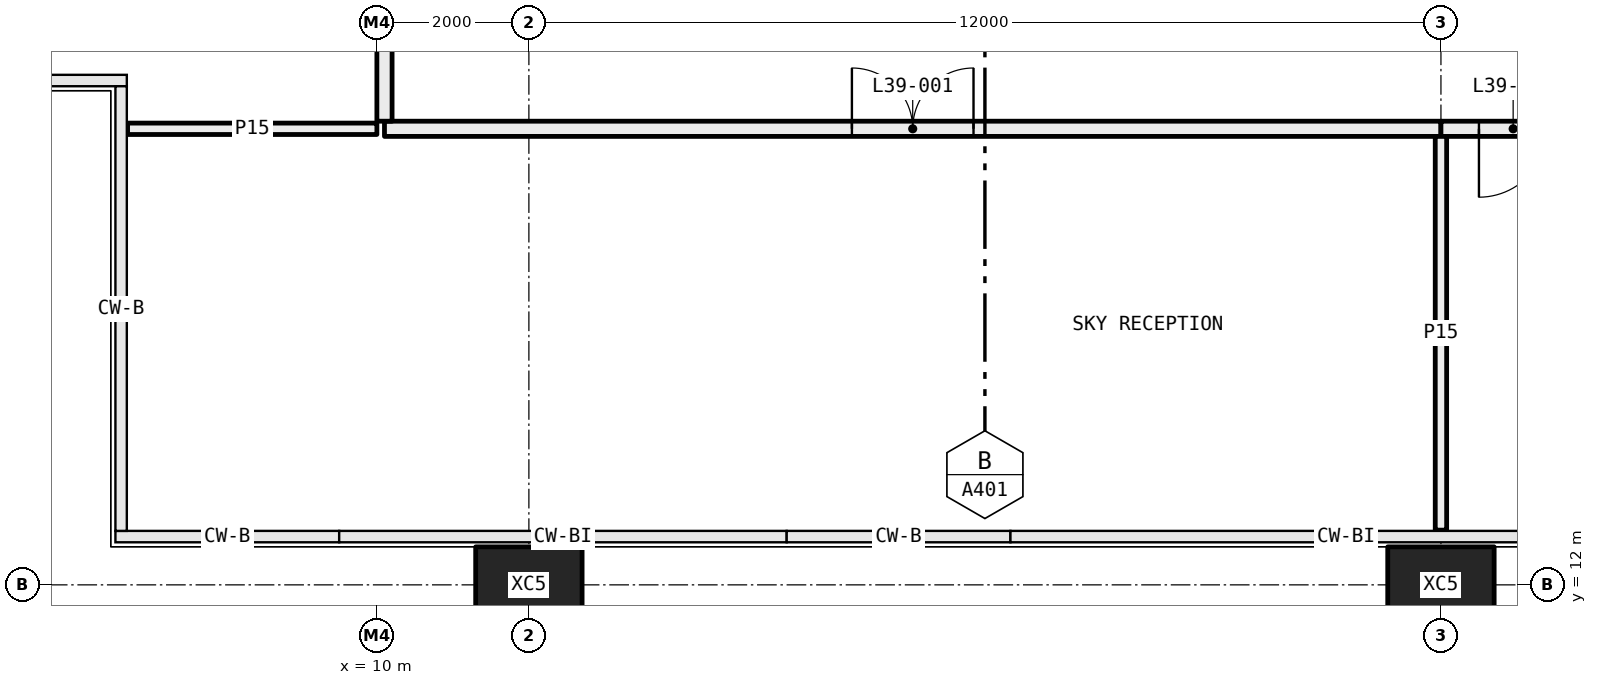
"""IFC4 building model, lengths in metres.
Left out: names, types, materials, properties, quantities, classifications, styles, units other than length and angle.
Written with IfcOpenShell. Run it as: python <this file> out.ifc"""

import sys

from ifc_helpers import new_model, si_unit, direction, frame, frame_2d, origin, origin_2d, place, context, subcontext, project, spatial, rectangle, hollow_rectangle, extrude, element, fill, save


model = new_model("IFC4")
c1 = context("Model", 3, precision=1e-05, world=origin(), true_north=direction((0.0, 1.0)))
c2 = subcontext(c1, "Body", "Model", "MODEL_VIEW")
j1 = project(units=[si_unit("LENGTHUNIT", "METRE"), si_unit("PLANEANGLEUNIT", "RADIAN")], contexts=[c1])
p1 = place(None, origin())
s1 = spatial("IfcSite", under=j1, at=p1, CompositionType="ELEMENT")
p2 = place(p1, origin())
s2 = spatial("IfcBuilding", under=s1, at=p2, CompositionType="ELEMENT")
p3 = place(p2, frame((0.0, 0.0, 148.35)))
s3 = spatial("IfcBuildingStorey", under=s2, at=p3, CompositionType="ELEMENT", Elevation=148.35)
for number, where, z_axis, x_axis in (
    (1, (12.0, 12.0, -0.4), (0.0, 0.0, 1.0), (1.0, 0.0, 0.0)),
    (2, (24.0, 12.0, -0.4), (0.0, 0.0, 1.0), (1.0, 0.0, 0.0)),
):
    element("IfcColumn", number, at=place(p3, frame(where, z_axis=z_axis, x_axis=x_axis)), inside=s3, PredefinedType="COLUMN", context=c2, shape_type="SweptSolid", body=[
        extrude(hollow_rectangle(XDim=1.4, YDim=1.0, WallThickness=0.055, at=origin_2d()), origin(), (0.0, 0.0, 1.0), 5.4),
    ])
p4 = place(p3, frame((10.1, 18.0, 0.0), z_axis=(0.0, 0.0, 1.0), x_axis=(1.0, 0.0, 0.0)))
e3 = element("IfcWall", 3, at=p4, inside=s3, PredefinedType="PARTITIONING", context=c2, shape_type="SweptSolid", body=[
    extrude(rectangle(XDim=13.9, YDim=0.2, at=frame_2d((6.95, 0.0))), origin(), (0.0, 0.0, 1.0), 5.0),
])
p5 = place(p4, frame((6.15, 0.0, 0.0)))
e4 = element("IfcOpeningElement", 4, at=p5, cuts=e3, PredefinedType="OPENING", context=c2, shape_type="SweptSolid", body=[
    extrude(rectangle(XDim=1.6, YDim=2.1, at=frame_2d((0.8, 1.05))), frame((0.0, 0.11, 0.0), z_axis=(0.0, -1.0, 0.0), x_axis=(1.0, 0.0, 0.0)), (0.0, 0.0, 1.0), 0.22),
])
p6 = place(p3, frame((24.0, 18.0, 0.0), z_axis=(0.0, 0.0, 1.0), x_axis=(1.0, 0.0, 0.0)))
e5 = element("IfcWall", 5, at=p6, inside=s3, PredefinedType="PARTITIONING", context=c2, shape_type="SweptSolid", body=[
    extrude(rectangle(XDim=1.9, YDim=0.2, at=frame_2d((0.95, 0.0))), origin(), (0.0, 0.0, 1.0), 5.0),
])
p7 = place(p6, frame((0.5, 0.0, 0.0)))
e6 = element("IfcOpeningElement", 6, at=p7, cuts=e5, PredefinedType="OPENING", context=c2, shape_type="SweptSolid", body=[
    extrude(rectangle(XDim=0.9, YDim=2.1, at=frame_2d((0.45, 1.05))), frame((0.0, 0.11, 0.0), z_axis=(0.0, -1.0, 0.0), x_axis=(1.0, 0.0, 0.0)), (0.0, 0.0, 1.0), 0.22),
])
p8 = place(p3, frame((10.1, 23.9, 0.0), z_axis=(0.0, 0.0, 1.0), x_axis=(0.0, -1.0, 0.0)))
e7 = element("IfcWall", 7, at=p8, inside=s3, PredefinedType="PARTITIONING", context=c2, shape_type="SweptSolid", body=[
    extrude(rectangle(XDim=5.8, YDim=0.2, at=frame_2d((2.9, 0.0))), origin(), (0.0, 0.0, 1.0), 5.0),
])
p9 = place(p3, frame((24.0, 12.72, 0.0), z_axis=(0.0, 0.0, 1.0), x_axis=(0.0, 1.0, 0.0)))
e8 = element("IfcWall", 8, at=p9, inside=s3, PredefinedType="PARTITIONING", context=c2, shape_type="SweptSolid", body=[
    extrude(rectangle(XDim=5.18, YDim=0.15, at=frame_2d((2.59, 0.0))), origin(), (0.0, 0.0, 1.0), 5.0),
])
p10 = place(p3, frame((10.0, 18.0, 0.0), z_axis=(0.0, 0.0, 1.0), x_axis=(-1.0, 0.0, 0.0)))
e9 = element("IfcWall", 9, at=p10, inside=s3, PredefinedType="PARTITIONING", context=c2, shape_type="SweptSolid", body=[
    extrude(rectangle(XDim=3.28, YDim=0.15, at=frame_2d((1.64, 0.0))), origin(), (0.0, 0.0, 1.0), 5.0),
])
p11 = place(p5, origin())
e10 = element("IfcDoor", 10, at=p11, inside=s3, OperationType="DOUBLE_DOOR_SINGLE_SWING", PredefinedType="DOOR", context=c2, shape_type="SweptSolid", body=[
    extrude(rectangle(XDim=1.6, YDim=2.1, at=frame_2d((0.8, 1.05))), frame((0.0, 0.025, 0.0), z_axis=(0.0, -1.0, 0.0), x_axis=(1.0, 0.0, 0.0)), (0.0, 0.0, 1.0), 0.05),
])
fill(e4, e10)
p12 = place(p7, frame((0.9, 0.0, 0.0), x_axis=(-1.0, 0.0, 0.0)))
e11 = element("IfcDoor", 11, at=p12, inside=s3, OperationType="SINGLE_SWING_LEFT", PredefinedType="DOOR", context=c2, shape_type="SweptSolid", body=[
    extrude(rectangle(XDim=0.9, YDim=2.1, at=frame_2d((0.45, 1.05))), frame((0.0, 0.025, 0.0), z_axis=(0.0, -1.0, 0.0), x_axis=(1.0, 0.0, 0.0)), (0.0, 0.0, 1.0), 0.05),
])
fill(e6, e11)
save(model, sys.argv[1])
